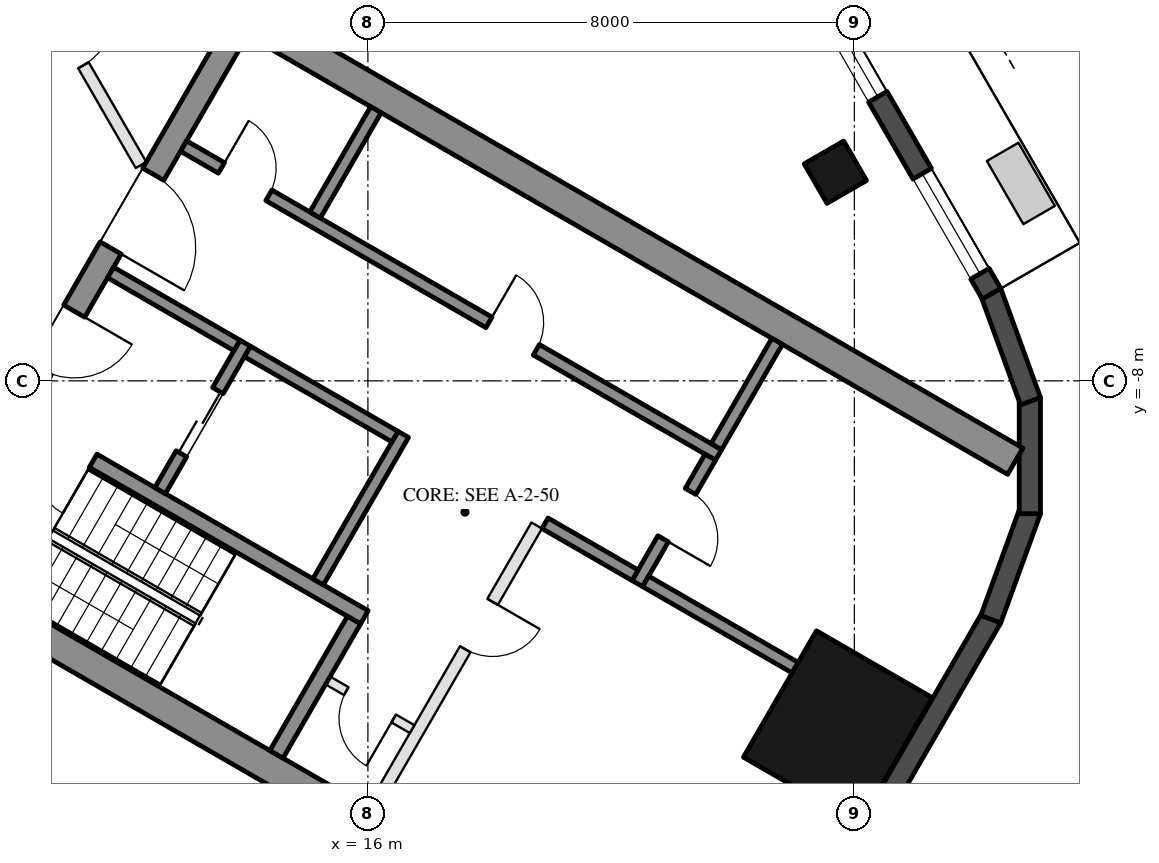
"""IFC4 building model, lengths in metres.
Left out: names, types, materials, properties, quantities, classifications, styles, units other than length and angle.
Written with IfcOpenShell. Run it as: python <this file> out.ifc"""

import sys

from ifc_helpers import new_model, si_unit, direction, frame, frame_2d, origin, origin_2d, place, context, subcontext, project, spatial, rectangle, hollow_rectangle, extrude, element, fill, save


model = new_model("IFC4")
c1 = context("Model", 3, precision=1e-05, world=origin(), true_north=direction((0.0, 1.0)))
c2 = subcontext(c1, "Body", "Model", "MODEL_VIEW")
j1 = project(units=[si_unit("LENGTHUNIT", "METRE"), si_unit("PLANEANGLEUNIT", "RADIAN")], contexts=[c1])
p1 = place(None, origin())
s1 = spatial("IfcSite", under=j1, at=p1, CompositionType="ELEMENT")
p2 = place(p1, origin())
s2 = spatial("IfcBuilding", under=s1, at=p2, CompositionType="ELEMENT")
p3 = place(p2, frame((0.0, 0.0, 216.9)))
s3 = spatial("IfcBuildingStorey", under=s2, at=p3, CompositionType="ELEMENT", Elevation=216.9)
p4 = place(p3, frame((23.688, -4.568, 0.0), z_axis=(0.0, 0.0, 1.0), x_axis=(-0.5, 0.866025403784, 0.0)))
e1 = element("IfcColumn", 1, at=p4, inside=s3, PredefinedType="COLUMN", context=c2, shape_type="SweptSolid", body=[
    extrude(hollow_rectangle(XDim=0.75, YDim=0.75, WallThickness=0.035, at=origin_2d()), origin(), (0.0, 0.0, 1.0), 3.7),
])
p5 = place(p3, frame((23.729, -13.7, 0.0), z_axis=(0.0, 0.0, 1.0), x_axis=(0.5, 0.866025403784, 0.0)))
e2 = element("IfcColumn", 2, at=p5, inside=s3, PredefinedType="COLUMN", context=c2, shape_type="SweptSolid", body=[
    extrude(hollow_rectangle(XDim=2.4, YDim=2.2, WallThickness=0.06, at=origin_2d()), origin(), (0.0, 0.0, 1.0), 3.7),
])
p6 = place(p3, frame((23.427, -16.792, 0.0), z_axis=(0.0, 0.0, 1.0), x_axis=(0.500018773155, 0.866014564827, 0.0)))
e3 = element("IfcWall", 3, at=p6, inside=s3, PredefinedType="SOLIDWALL", context=c2, shape_type="SweptSolid", body=[
    extrude(rectangle(XDim=5.658, YDim=0.35, at=frame_2d((2.829, 0.0))), origin(), (0.0, 0.0, 1.0), 3.55),
])
for number, where, z_axis, x_axis in (
    (4, (26.244, -11.92, 0.0), (0.0, 0.0, 1.0), (0.342, 0.94, 0.0)),
    (5, (26.886, -10.185, 0.0), (0.0, 0.0, 1.0), (0.0, 1.0, 0.0)),
    (6, (26.897, -8.335, 0.0), (0.0, 0.0, 1.0), (-0.342, 0.94, 0.0)),
):
    element("IfcWall", number, at=place(p3, frame(where, z_axis=z_axis, x_axis=x_axis)), inside=s3, PredefinedType="SOLIDWALL", context=c2, shape_type="SweptSolid", body=[
        extrude(rectangle(XDim=1.91, YDim=0.35, at=frame_2d((0.955, 0.0))), origin(), (0.0, 0.0, 1.0), 3.55),
    ])
p7 = place(p3, frame((26.257, -6.567, 0.0), z_axis=(0.0, 0.0, 1.0), x_axis=(-0.500023526245, 0.866011820475, 0.0)))
e7 = element("IfcWall", 7, at=p7, inside=s3, PredefinedType="SOLIDWALL", context=c2, shape_type="SweptSolid", body=[
    extrude(rectangle(XDim=11.816, YDim=0.35, at=frame_2d((5.908, 0.0))), origin(), (0.0, 0.0, 1.0), 3.55),
])
p8 = place(p7, frame((0.38, 0.0, 0.3)))
e8 = element("IfcOpeningElement", 8, at=p8, cuts=e7, PredefinedType="OPENING", context=c2, shape_type="SweptSolid", body=[
    extrude(rectangle(XDim=1.9, YDim=2.65, at=frame_2d((0.95, 1.325))), frame((0.0, 0.185, 0.0), z_axis=(0.0, -1.0, 0.0), x_axis=(1.0, 0.0, 0.0)), (0.0, 0.0, 1.0), 0.37),
])
p9 = place(p7, frame((7.791, 0.0, 0.0)))
e9 = element("IfcOpeningElement", 9, at=p9, cuts=e7, PredefinedType="OPENING", context=c2, shape_type="SweptSolid", body=[
    extrude(rectangle(XDim=2.4, YDim=2.4, at=frame_2d((1.2, 1.2))), frame((0.0, 0.185, 0.0), z_axis=(0.0, -1.0, 0.0), x_axis=(1.0, 0.0, 0.0)), (0.0, 0.0, 1.0), 0.37),
])
p10 = place(p7, frame((3.741, 0.0, 0.3)))
e10 = element("IfcOpeningElement", 10, at=p10, cuts=e7, PredefinedType="OPENING", context=c2, shape_type="SweptSolid", body=[
    extrude(rectangle(XDim=1.7, YDim=2.65, at=frame_2d((0.85, 1.325))), frame((0.0, 0.185, 0.0), z_axis=(0.0, -1.0, 0.0), x_axis=(1.0, 0.0, 0.0)), (0.0, 0.0, 1.0), 0.37),
])
p11 = place(p7, frame((5.741, 0.0, 0.3)))
e11 = element("IfcOpeningElement", 11, at=p11, cuts=e7, PredefinedType="OPENING", context=c2, shape_type="SweptSolid", body=[
    extrude(rectangle(XDim=1.7, YDim=2.65, at=frame_2d((0.85, 1.325))), frame((0.0, 0.185, 0.0), z_axis=(0.0, -1.0, 0.0), x_axis=(1.0, 0.0, 0.0)), (0.0, 0.0, 1.0), 0.37),
])
for number, where, z_axis, x_axis in (
    (12, (8.547, -10.997, 0.0), (0.0, 0.0, 1.0), (0.866, -0.5, 0.0)),
    (13, (13.797, -1.903, 0.0), (0.0, 0.0, 1.0), (0.866, -0.5, 0.0)),
):
    element("IfcWall", number, at=place(p3, frame(where, z_axis=z_axis, x_axis=x_axis)), inside=s3, PredefinedType="SHEAR", context=c2, shape_type="SweptSolid", body=[
        extrude(rectangle(XDim=14.837, YDim=0.5, at=frame_2d((7.418, 0.0))), origin(), (0.0, 0.0, 1.0), 3.5),
    ])
p12 = place(p3, frame((8.845, -10.88, 0.0), z_axis=(0.0, 0.0, 1.0), x_axis=(0.500004234368, 0.866022959057, 0.0)))
e14 = element("IfcWall", 14, at=p12, inside=s3, PredefinedType="SHEAR", context=c2, shape_type="SweptSolid", body=[
    extrude(rectangle(XDim=10.0, YDim=0.4, at=frame_2d((5.0, 0.0))), origin(), (0.0, 0.0, 1.0), 3.5),
])
p13 = place(p12, frame((3.55, 0.0, 0.0)))
e15 = element("IfcOpeningElement", 15, at=p13, cuts=e14, PredefinedType="OPENING", context=c2, shape_type="SweptSolid", body=[
    extrude(rectangle(XDim=1.1, YDim=2.1, at=frame_2d((0.55, 1.05))), frame((0.0, 0.21, 0.0), z_axis=(0.0, -1.0, 0.0), x_axis=(1.0, 0.0, 0.0)), (0.0, 0.0, 1.0), 0.42),
])
p14 = place(p12, frame((5.85, 0.0, 0.0)))
e16 = element("IfcOpeningElement", 16, at=p14, cuts=e14, PredefinedType="OPENING", context=c2, shape_type="SweptSolid", body=[
    extrude(rectangle(XDim=1.4, YDim=2.1, at=frame_2d((0.7, 1.05))), frame((0.0, 0.21, 0.0), z_axis=(0.0, -1.0, 0.0), x_axis=(1.0, 0.0, 0.0)), (0.0, 0.0, 1.0), 0.42),
])
p15 = place(p3, frame((10.356, -8.664, 0.0), z_axis=(0.0, 0.0, 1.0), x_axis=(0.866028629588, -0.499994412703, 0.0)))
e17 = element("IfcWall", 17, at=p15, inside=s3, PredefinedType="SHEAR", context=c2, shape_type="SweptSolid", body=[
    extrude(rectangle(XDim=6.45, YDim=0.25, at=frame_2d((3.225, 0.0))), origin(), (0.0, 0.0, 1.0), 3.5),
])
p16 = place(p15, frame((0.3, 0.0, 0.0)))
e18 = element("IfcOpeningElement", 18, at=p16, cuts=e17, PredefinedType="OPENING", context=c2, shape_type="SweptSolid", body=[
    extrude(rectangle(XDim=1.0, YDim=2.1, at=frame_2d((0.5, 1.05))), frame((0.0, 0.135, 0.0), z_axis=(0.0, -1.0, 0.0), x_axis=(1.0, 0.0, 0.0)), (0.0, 0.0, 1.0), 0.27),
])
p17 = place(p3, frame((14.496, -14.143, 0.0), z_axis=(0.0, 0.0, 1.0), x_axis=(0.500062241894, 0.865989465428, 0.0)))
e19 = element("IfcWall", 19, at=p17, inside=s3, PredefinedType="SHEAR", context=c2, shape_type="SweptSolid", body=[
    extrude(rectangle(XDim=2.55, YDim=0.25, at=frame_2d((1.275, 0.0))), origin(), (0.0, 0.0, 1.0), 3.5),
])
p18 = place(p3, frame((15.181, -11.305, 0.0), z_axis=(0.0, 0.0, 1.0), x_axis=(0.49994636267, 0.866056369097, 0.0)))
e20 = element("IfcWall", 20, at=p18, inside=s3, PredefinedType="SHEAR", context=c2, shape_type="SweptSolid", body=[
    extrude(rectangle(XDim=2.8, YDim=0.2, at=frame_2d((1.4, 0.0))), origin(), (0.0, 0.0, 1.0), 3.5),
])
p19 = place(p3, frame((12.583, -9.805, 0.0), z_axis=(0.0, 0.0, 1.0), x_axis=(0.49994636267, 0.866056369097, 0.0)))
e21 = element("IfcWall", 21, at=p19, inside=s3, PredefinedType="SHEAR", context=c2, shape_type="SweptSolid", body=[
    extrude(rectangle(XDim=2.8, YDim=0.2, at=frame_2d((1.4, 0.0))), origin(), (0.0, 0.0, 1.0), 3.5),
])
p20 = place(p19, frame((0.7, 0.0, 0.0)))
e22 = element("IfcOpeningElement", 22, at=p20, cuts=e21, PredefinedType="OPENING", context=c2, shape_type="SweptSolid", body=[
    extrude(rectangle(XDim=1.2, YDim=2.1, at=frame_2d((0.6, 1.05))), frame((0.0, 0.11, 0.0), z_axis=(0.0, -1.0, 0.0), x_axis=(1.0, 0.0, 0.0)), (0.0, 0.0, 1.0), 0.22),
])
p21 = place(p3, frame((11.768, -6.217, 0.0), z_axis=(0.0, 0.0, 1.0), x_axis=(0.866050077142, -0.499957262057, 0.0)))
e23 = element("IfcWall", 23, at=p21, inside=s3, PredefinedType="SHEAR", context=c2, shape_type="SweptSolid", body=[
    extrude(rectangle(XDim=2.4, YDim=0.2, at=frame_2d((1.2, 0.0))), origin(), (0.0, 0.0, 1.0), 3.5),
])
p22 = place(p3, frame((14.02, -7.517, 0.0), z_axis=(0.0, 0.0, 1.0), x_axis=(0.866034573852, -0.49998411664, 0.0)))
e24 = element("IfcWall", 24, at=p22, inside=s3, PredefinedType="SHEAR", context=c2, shape_type="SweptSolid", body=[
    extrude(rectangle(XDim=2.8, YDim=0.2, at=frame_2d((1.4, 0.0))), origin(), (0.0, 0.0, 1.0), 3.5),
])
p23 = place(p3, frame((12.968, -4.138, 0.0), z_axis=(0.0, 0.0, 1.0), x_axis=(0.866028328073, -0.49999493495, 0.0)))
e25 = element("IfcWall", 25, at=p23, inside=s3, PredefinedType="SHEAR", context=c2, shape_type="SweptSolid", body=[
    extrude(rectangle(XDim=10.16, YDim=0.2, at=frame_2d((5.08, 0.0))), origin(), (0.0, 0.0, 1.0), 3.5),
])
p24 = place(p23, frame((0.72, 0.0, 0.0)))
e26 = element("IfcOpeningElement", 26, at=p24, cuts=e25, PredefinedType="OPENING", context=c2, shape_type="SweptSolid", body=[
    extrude(rectangle(XDim=0.9, YDim=2.1, at=frame_2d((0.45, 1.05))), frame((0.0, 0.11, 0.0), z_axis=(0.0, -1.0, 0.0), x_axis=(1.0, 0.0, 0.0)), (0.0, 0.0, 1.0), 0.22),
])
p25 = place(p23, frame((5.8, 0.0, 0.0)))
e27 = element("IfcOpeningElement", 27, at=p25, cuts=e25, PredefinedType="OPENING", context=c2, shape_type="SweptSolid", body=[
    extrude(rectangle(XDim=0.9, YDim=2.1, at=frame_2d((0.45, 1.05))), frame((0.0, 0.11, 0.0), z_axis=(0.0, -1.0, 0.0), x_axis=(1.0, 0.0, 0.0)), (0.0, 0.0, 1.0), 0.22),
])
p26 = place(p3, frame((20.43, -11.333, 0.0), z_axis=(0.0, 0.0, 1.0), x_axis=(0.500001309137, 0.866024647952, 0.0)))
e28 = element("IfcWall", 28, at=p26, inside=s3, PredefinedType="SHEAR", context=c2, shape_type="SweptSolid", body=[
    extrude(rectangle(XDim=2.4, YDim=0.2, at=frame_2d((1.2, 0.0))), origin(), (0.0, 0.0, 1.0), 3.5),
])
p27 = place(p26, frame((0.85, 0.0, 0.0)))
e29 = element("IfcOpeningElement", 29, at=p27, cuts=e28, PredefinedType="OPENING", context=c2, shape_type="SweptSolid", body=[
    extrude(rectangle(XDim=0.9, YDim=2.1, at=frame_2d((0.45, 1.05))), frame((0.0, 0.11, 0.0), z_axis=(0.0, -1.0, 0.0), x_axis=(1.0, 0.0, 0.0)), (0.0, 0.0, 1.0), 0.22),
])
p28 = place(p3, frame((18.913, -10.342, 0.0), z_axis=(0.0, 0.0, 1.0), x_axis=(0.866038183914, -0.499977863513, 0.0)))
e30 = element("IfcWall", 30, at=p28, inside=s3, PredefinedType="SHEAR", context=c2, shape_type="SweptSolid", body=[
    extrude(rectangle(XDim=1.71, YDim=0.2, at=frame_2d((0.855, 0.0))), origin(), (0.0, 0.0, 1.0), 3.5),
])
for number, where, z_axis, x_axis in (
    (31, (15.131, -5.272, 0.0), (0.0, 0.0, 1.0), (0.5, 0.866, 0.0)),
    (32, (21.73, -9.082, 0.0), (0.0, 0.0, 1.0), (0.5, 0.866, 0.0)),
):
    element("IfcWall", number, at=place(p3, frame(where, z_axis=z_axis, x_axis=x_axis)), inside=s3, PredefinedType="SHEAR", context=c2, shape_type="SweptSolid", body=[
        extrude(rectangle(XDim=2.0, YDim=0.2, at=frame_2d((1.0, 0.0))), origin(), (0.0, 0.0, 1.0), 3.5),
    ])
p29 = place(p3, frame((20.567, -11.297, 0.0), z_axis=(0.0, 0.0, 1.0), x_axis=(0.866055327414, -0.49994816717, 0.0)))
e33 = element("IfcWall", 33, at=p29, inside=s3, PredefinedType="SHEAR", context=c2, shape_type="SweptSolid", body=[
    extrude(rectangle(XDim=2.84, YDim=0.2, at=frame_2d((1.42, 0.0))), origin(), (0.0, 0.0, 1.0), 3.5),
])
p30 = place(p3, frame((16.076, -15.055, 0.0), z_axis=(0.0, 0.0, 1.0), x_axis=(0.499995103361, 0.866028230842, 0.0)))
e34 = element("IfcWall", 34, at=p30, inside=s3, PredefinedType="PARTITIONING", context=c2, shape_type="SweptSolid", body=[
    extrude(rectangle(XDim=5.4, YDim=0.2, at=frame_2d((2.7, 0.0))), origin(), (0.0, 0.0, 1.0), 3.5),
])
p31 = place(p30, frame((3.05, 0.0, 0.0)))
e35 = element("IfcOpeningElement", 35, at=p31, cuts=e34, PredefinedType="OPENING", context=c2, shape_type="SweptSolid", body=[
    extrude(rectangle(XDim=0.9, YDim=2.1, at=frame_2d((0.45, 1.05))), frame((0.0, 0.11, 0.0), z_axis=(0.0, -1.0, 0.0), x_axis=(1.0, 0.0, 0.0)), (0.0, 0.0, 1.0), 0.22),
])
p32 = place(p3, frame((15.342, -12.928, 0.0), z_axis=(0.0, 0.0, 1.0), x_axis=(0.865989903783, -0.500061482766, 0.0)))
e36 = element("IfcWall", 36, at=p32, inside=s3, PredefinedType="PARTITIONING", context=c2, shape_type="SweptSolid", body=[
    extrude(rectangle(XDim=1.6, YDim=0.15, at=frame_2d((0.8, 0.0))), origin(), (0.0, 0.0, 1.0), 3.5),
])
p33 = place(p32, frame((0.35, 0.0, 0.0)))
e37 = element("IfcOpeningElement", 37, at=p33, cuts=e36, PredefinedType="OPENING", context=c2, shape_type="SweptSolid", body=[
    extrude(rectangle(XDim=0.9, YDim=2.1, at=frame_2d((0.45, 1.05))), frame((0.0, 0.085, 0.0), z_axis=(0.0, -1.0, 0.0), x_axis=(1.0, 0.0, 0.0)), (0.0, 0.0, 1.0), 0.17),
])
p34 = place(p3, frame((9.875, -0.303, 0.0), z_axis=(0.0, 0.0, 1.0), x_axis=(0.500026984917, -0.866009823475, 0.0)))
e38 = element("IfcWall", 38, at=p34, inside=s3, PredefinedType="PARTITIONING", context=c2, shape_type="SweptSolid", body=[
    extrude(rectangle(XDim=4.788, YDim=0.2, at=frame_2d((2.394, 0.0))), origin(), (0.0, 0.0, 1.0), 2.95),
])
p35 = place(p34, frame((1.894, 0.0, 0.0)))
e39 = element("IfcOpeningElement", 39, at=p35, cuts=e38, PredefinedType="OPENING", context=c2, shape_type="SweptSolid", body=[
    extrude(rectangle(XDim=1.0, YDim=2.1, at=frame_2d((0.5, 1.05))), frame((0.0, 0.11, 0.0), z_axis=(0.0, -1.0, 0.0), x_axis=(1.0, 0.0, 0.0)), (0.0, 0.0, 1.0), 0.22),
])
p36 = place(p8, origin())
e40 = element("IfcWindow", 40, at=p36, inside=s3, PartitioningType="SINGLE_PANEL", PredefinedType="WINDOW", context=c2, shape_type="SweptSolid", body=[
    extrude(rectangle(XDim=1.9, YDim=2.65, at=frame_2d((0.95, 1.325))), frame((0.0, 0.03, 0.0), z_axis=(0.0, -1.0, 0.0), x_axis=(1.0, 0.0, 0.0)), (0.0, 0.0, 1.0), 0.06),
])
fill(e8, e40)
p37 = place(p10, origin())
e41 = element("IfcWindow", 41, at=p37, inside=s3, PartitioningType="SINGLE_PANEL", PredefinedType="WINDOW", context=c2, shape_type="SweptSolid", body=[
    extrude(rectangle(XDim=1.7, YDim=2.65, at=frame_2d((0.85, 1.325))), frame((0.0, 0.03, 0.0), z_axis=(0.0, -1.0, 0.0), x_axis=(1.0, 0.0, 0.0)), (0.0, 0.0, 1.0), 0.06),
])
fill(e10, e41)
p38 = place(p20, origin())
e42 = element("IfcDoor", 42, at=p38, inside=s3, OperationType="DOUBLE_DOOR_SLIDING", PredefinedType="DOOR", context=c2, shape_type="SweptSolid", body=[
    extrude(rectangle(XDim=1.2, YDim=2.1, at=frame_2d((0.6, 1.05))), frame((0.0, 0.025, 0.0), z_axis=(0.0, -1.0, 0.0), x_axis=(1.0, 0.0, 0.0)), (0.0, 0.0, 1.0), 0.05),
])
fill(e22, e42)
p39 = place(p33, frame((0.9, 0.0, 0.0), z_axis=(0.0, 0.0, 1.0), x_axis=(-1.0, 0.0, 0.0)))
e43 = element("IfcDoor", 43, at=p39, inside=s3, OperationType="SINGLE_SWING_LEFT", PredefinedType="DOOR", context=c2, shape_type="SweptSolid", body=[
    extrude(rectangle(XDim=0.9, YDim=2.1, at=frame_2d((0.45, 1.05))), frame((0.0, 0.025, 0.0), z_axis=(0.0, -1.0, 0.0), x_axis=(1.0, 0.0, 0.0)), (0.0, 0.0, 1.0), 0.05),
])
fill(e37, e43)
p40 = place(p24, origin())
e44 = element("IfcDoor", 44, at=p40, inside=s3, OperationType="SINGLE_SWING_LEFT", PredefinedType="DOOR", context=c2, shape_type="SweptSolid", body=[
    extrude(rectangle(XDim=0.9, YDim=2.1, at=frame_2d((0.45, 1.05))), frame((0.0, 0.025, 0.0), z_axis=(0.0, -1.0, 0.0), x_axis=(1.0, 0.0, 0.0)), (0.0, 0.0, 1.0), 0.05),
])
fill(e26, e44)
p41 = place(p25, origin())
e45 = element("IfcDoor", 45, at=p41, inside=s3, OperationType="SINGLE_SWING_LEFT", PredefinedType="DOOR", context=c2, shape_type="SweptSolid", body=[
    extrude(rectangle(XDim=0.9, YDim=2.1, at=frame_2d((0.45, 1.05))), frame((0.0, 0.025, 0.0), z_axis=(0.0, -1.0, 0.0), x_axis=(1.0, 0.0, 0.0)), (0.0, 0.0, 1.0), 0.05),
])
fill(e27, e45)
p42 = place(p27, frame((0.9, 0.0, 0.0), z_axis=(0.0, 0.0, 1.0), x_axis=(-1.0, 0.0, 0.0)))
e46 = element("IfcDoor", 46, at=p42, inside=s3, OperationType="SINGLE_SWING_RIGHT", PredefinedType="DOOR", context=c2, shape_type="SweptSolid", body=[
    extrude(rectangle(XDim=0.9, YDim=2.1, at=frame_2d((0.45, 1.05))), frame((0.0, 0.025, 0.0), z_axis=(0.0, -1.0, 0.0), x_axis=(1.0, 0.0, 0.0)), (0.0, 0.0, 1.0), 0.05),
])
fill(e29, e46)
p43 = place(p31, frame((0.9, 0.0, 0.0), z_axis=(0.0, 0.0, 1.0), x_axis=(-1.0, 0.0, 0.0)))
e47 = element("IfcDoor", 47, at=p43, inside=s3, OperationType="SINGLE_SWING_LEFT", PredefinedType="DOOR", context=c2, shape_type="SweptSolid", body=[
    extrude(rectangle(XDim=0.9, YDim=2.1, at=frame_2d((0.45, 1.05))), frame((0.0, 0.025, 0.0), z_axis=(0.0, -1.0, 0.0), x_axis=(1.0, 0.0, 0.0)), (0.0, 0.0, 1.0), 0.05),
])
fill(e35, e47)
p44 = place(p13, frame((1.1, 0.0, 0.0), z_axis=(0.0, 0.0, 1.0), x_axis=(-1.0, 0.0, 0.0)))
e48 = element("IfcDoor", 48, at=p44, inside=s3, OperationType="SINGLE_SWING_LEFT", PredefinedType="DOOR", context=c2, shape_type="SweptSolid", body=[
    extrude(rectangle(XDim=1.1, YDim=2.1, at=frame_2d((0.55, 1.05))), frame((0.0, 0.025, 0.0), z_axis=(0.0, -1.0, 0.0), x_axis=(1.0, 0.0, 0.0)), (0.0, 0.0, 1.0), 0.05),
])
fill(e15, e48)
p45 = place(p14, frame((1.4, 0.0, 0.0), z_axis=(0.0, 0.0, 1.0), x_axis=(-1.0, 0.0, 0.0)))
e49 = element("IfcDoor", 49, at=p45, inside=s3, OperationType="DOUBLE_DOOR_SINGLE_SWING", PredefinedType="DOOR", context=c2, shape_type="SweptSolid", body=[
    extrude(rectangle(XDim=1.4, YDim=2.1, at=frame_2d((0.7, 1.05))), frame((0.0, 0.025, 0.0), z_axis=(0.0, -1.0, 0.0), x_axis=(1.0, 0.0, 0.0)), (0.0, 0.0, 1.0), 0.05),
])
fill(e16, e49)
p46 = place(p16, frame((1.0, 0.0, 0.0), z_axis=(0.0, 0.0, 1.0), x_axis=(-1.0, 0.0, 0.0)))
e50 = element("IfcDoor", 50, at=p46, inside=s3, OperationType="SINGLE_SWING_LEFT", PredefinedType="DOOR", context=c2, shape_type="SweptSolid", body=[
    extrude(rectangle(XDim=1.0, YDim=2.1, at=frame_2d((0.5, 1.05))), frame((0.0, 0.025, 0.0), z_axis=(0.0, -1.0, 0.0), x_axis=(1.0, 0.0, 0.0)), (0.0, 0.0, 1.0), 0.05),
])
fill(e18, e50)
p47 = place(p35, origin())
e51 = element("IfcDoor", 51, at=p47, inside=s3, OperationType="SINGLE_SWING_LEFT", PredefinedType="DOOR", context=c2, shape_type="SweptSolid", body=[
    extrude(rectangle(XDim=1.0, YDim=2.1, at=frame_2d((0.5, 1.05))), frame((0.0, 0.025, 0.0), z_axis=(0.0, -1.0, 0.0), x_axis=(1.0, 0.0, 0.0)), (0.0, 0.0, 1.0), 0.05),
])
fill(e39, e51)
save(model, sys.argv[1])
